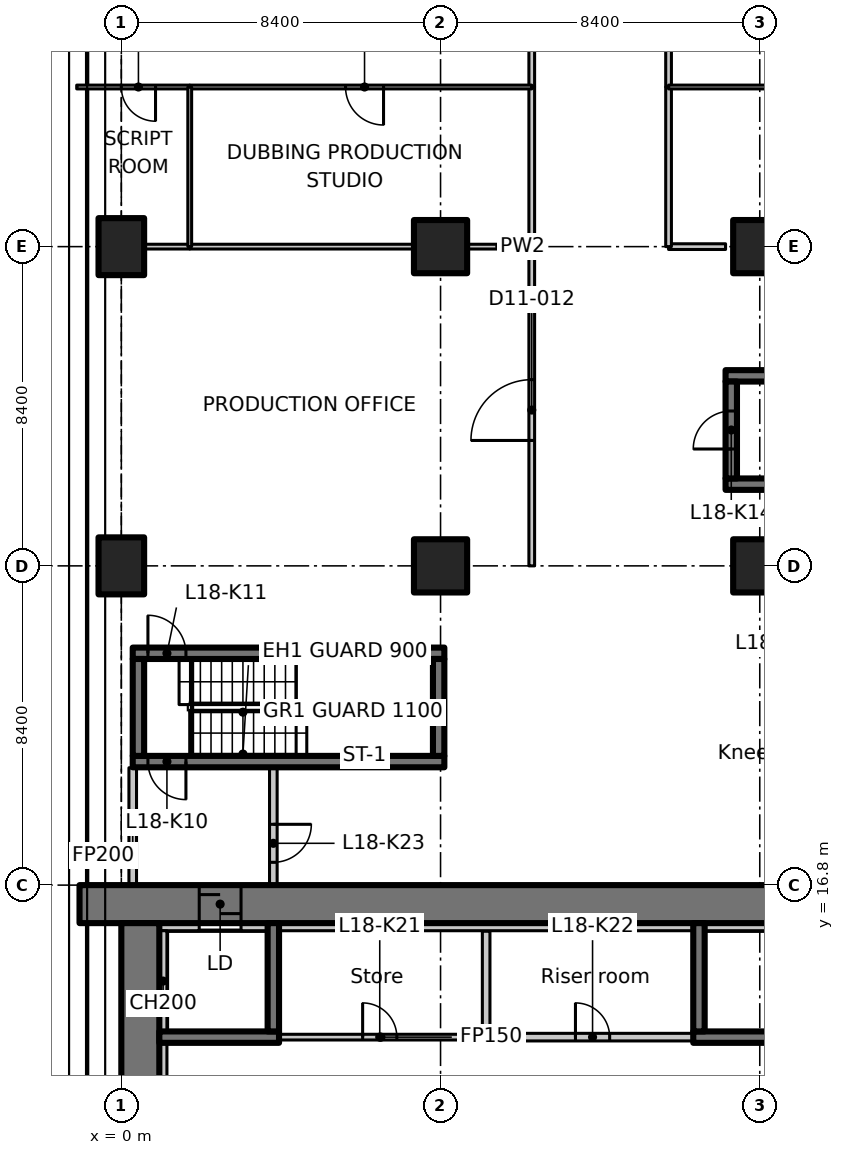
"""IFC4 building model, lengths in metres.
Left out: names, types, materials, properties, quantities, classifications, styles, units other than length and angle.
Written with IfcOpenShell. Run it as: python <this file> out.ifc"""

import sys

from ifc_helpers import new_model, si_unit, direction, frame, frame_2d, origin, origin_2d, place, context, subcontext, project, spatial, polyline, rectangle, outline, extrude, element, fill, save


model = new_model("IFC4")
c1 = context("Model", 3, precision=1e-05, world=origin(), true_north=direction((0.0, 1.0)))
c2 = subcontext(c1, "Body", "Model", "MODEL_VIEW")
j1 = project(units=[si_unit("LENGTHUNIT", "METRE"), si_unit("PLANEANGLEUNIT", "RADIAN")], contexts=[c1])
p1 = place(None, origin())
s1 = spatial("IfcSite", under=j1, at=p1, CompositionType="ELEMENT")
p2 = place(p1, origin())
s2 = spatial("IfcBuilding", under=s1, at=p2, CompositionType="ELEMENT")
p3 = place(p2, frame((0.0, 0.0, 79.7)))
s3 = spatial("IfcBuildingStorey", under=s2, at=p3, CompositionType="ELEMENT", Elevation=79.7)
for number, where, z_axis, x_axis in (
    (1, (0.0, 25.2, 0.0), (0.0, 0.0, 1.0), (1.0, 0.0, 0.0)),
    (2, (0.0, 33.6, 0.0), (0.0, 0.0, 1.0), (1.0, 0.0, 0.0)),
):
    element("IfcColumn", number, at=place(p3, frame(where, z_axis=z_axis, x_axis=x_axis)), inside=s3, PredefinedType="COLUMN", context=c2, shape_type="SweptSolid", body=[
        extrude(rectangle(XDim=1.2, YDim=1.5, at=origin_2d()), origin(), (0.0, 0.0, 1.0), 3.35),
    ])
for number, where, z_axis, x_axis in (
    (3, (8.4, 25.2, 0.0), (0.0, 0.0, 1.0), (1.0, 0.0, 0.0)),
    (4, (8.4, 33.6, 0.0), (0.0, 0.0, 1.0), (1.0, 0.0, 0.0)),
    (5, (16.8, 25.2, 0.0), (0.0, 0.0, 1.0), (1.0, 0.0, 0.0)),
    (6, (16.8, 33.6, 0.0), (0.0, 0.0, 1.0), (1.0, 0.0, 0.0)),
):
    element("IfcColumn", number, at=place(p3, frame(where, z_axis=z_axis, x_axis=x_axis)), inside=s3, PredefinedType="COLUMN", context=c2, shape_type="SweptSolid", body=[
        extrude(rectangle(XDim=1.4, YDim=1.4, at=origin_2d()), origin(), (0.0, 0.0, 1.0), 3.35),
    ])
p4 = place(p3, frame((-1.1, 16.3, 0.0), z_axis=(0.0, 0.0, 1.0), x_axis=(1.0, 0.0, 0.0)))
e7 = element("IfcWall", 7, at=p4, inside=s3, PredefinedType="SHEAR", context=c2, shape_type="SweptSolid", body=[
    extrude(rectangle(XDim=22.1, YDim=1.0, at=frame_2d((11.05, 0.0))), origin(), (0.0, 0.0, 1.0), 3.35),
])
p5 = place(p4, frame((3.15, 0.0, 0.0)))
e8 = element("IfcOpeningElement", 8, at=p5, cuts=e7, PredefinedType="OPENING", context=c2, shape_type="SweptSolid", body=[
    extrude(rectangle(XDim=1.1, YDim=2.3, at=frame_2d((0.55, 1.15))), frame((0.0, 0.51, 0.0), z_axis=(0.0, -1.0, 0.0), x_axis=(1.0, 0.0, 0.0)), (0.0, 0.0, 1.0), 1.02),
])
p6 = place(p3, frame((0.5, 6.936, 0.0), z_axis=(0.0, 0.0, 1.0), x_axis=(0.0, 1.0, 0.0)))
e9 = element("IfcWall", 9, at=p6, inside=s3, PredefinedType="SHEAR", context=c2, shape_type="SweptSolid", body=[
    extrude(rectangle(XDim=8.864, YDim=1.0, at=frame_2d((4.432, 0.0))), origin(), (0.0, 0.0, 1.0), 3.35),
])
p7 = place(p3, frame((1.0, 15.7, 0.0), z_axis=(0.0, 0.0, 1.0), x_axis=(1.0, 0.0, 0.0)))
e10 = element("IfcWall", 10, at=p7, inside=s3, PredefinedType="PARTITIONING", context=c2, shape_type="SweptSolid", body=[
    extrude(rectangle(XDim=1.05, YDim=0.2, at=frame_2d((0.525, 0.0))), origin(), (0.0, 0.0, 1.0), 3.35),
])
p8 = place(p3, frame((1.0, 12.8, 0.0), z_axis=(0.0, 0.0, 1.0), x_axis=(1.0, 0.0, 0.0)))
e11 = element("IfcWall", 11, at=p8, inside=s3, PredefinedType="SHEAR", context=c2, shape_type="SweptSolid", body=[
    extrude(rectangle(XDim=3.15, YDim=0.3, at=frame_2d((1.575, 0.0))), origin(), (0.0, 0.0, 1.0), 3.35),
])
p9 = place(p3, frame((4.0, 12.95, 0.0), z_axis=(0.0, 0.0, 1.0), x_axis=(0.0, 1.0, 0.0)))
e12 = element("IfcWall", 12, at=p9, inside=s3, PredefinedType="SHEAR", context=c2, shape_type="SweptSolid", body=[
    extrude(rectangle(XDim=2.85, YDim=0.3, at=frame_2d((1.425, 0.0))), origin(), (0.0, 0.0, 1.0), 3.35),
])
p10 = place(p3, frame((15.05, 12.8, 0.0), z_axis=(0.0, 0.0, 1.0), x_axis=(1.0, 0.0, 0.0)))
e13 = element("IfcWall", 13, at=p10, inside=s3, PredefinedType="SHEAR", context=c2, shape_type="SweptSolid", body=[
    extrude(rectangle(XDim=5.9, YDim=0.3, at=frame_2d((2.95, 0.0))), origin(), (0.0, 0.0, 1.0), 3.35),
])
p11 = place(p10, frame((3.8, 0.0, 0.0)))
e14 = element("IfcOpeningElement", 14, at=p11, cuts=e13, PredefinedType="OPENING", context=c2, shape_type="SweptSolid", body=[
    extrude(rectangle(XDim=1.1, YDim=2.3, at=frame_2d((0.55, 1.15))), frame((0.0, 0.16, 0.0), z_axis=(0.0, -1.0, 0.0), x_axis=(1.0, 0.0, 0.0)), (0.0, 0.0, 1.0), 0.32),
])
p12 = place(p3, frame((15.2, 12.95, 0.0), z_axis=(0.0, 0.0, 1.0), x_axis=(0.0, 1.0, 0.0)))
e15 = element("IfcWall", 15, at=p12, inside=s3, PredefinedType="SHEAR", context=c2, shape_type="SweptSolid", body=[
    extrude(rectangle(XDim=2.85, YDim=0.3, at=frame_2d((1.425, 0.0))), origin(), (0.0, 0.0, 1.0), 3.35),
])
p13 = place(p3, frame((8.5, 20.05, 0.0), z_axis=(0.0, 0.0, 1.0), x_axis=(-1.0, 0.0, 0.0)))
e16 = element("IfcWall", 16, at=p13, inside=s3, PredefinedType="SHEAR", context=c2, shape_type="SweptSolid", body=[
    extrude(rectangle(XDim=8.2, YDim=0.3, at=frame_2d((4.1, 0.0))), origin(), (0.0, 0.0, 1.0), 3.35),
])
p14 = place(p13, frame((6.8, 0.0, 0.0)))
e17 = element("IfcOpeningElement", 17, at=p14, cuts=e16, PredefinedType="OPENING", context=c2, shape_type="SweptSolid", body=[
    extrude(rectangle(XDim=1.0, YDim=2.1, at=frame_2d((0.5, 1.05))), frame((0.0, 0.16, 0.0), z_axis=(0.0, -1.0, 0.0), x_axis=(1.0, 0.0, 0.0)), (0.0, 0.0, 1.0), 0.32),
])
p15 = place(p3, frame((0.3, 22.9, 0.0), z_axis=(0.0, 0.0, 1.0), x_axis=(1.0, 0.0, 0.0)))
e18 = element("IfcWall", 18, at=p15, inside=s3, PredefinedType="SHEAR", context=c2, shape_type="SweptSolid", body=[
    extrude(rectangle(XDim=8.2, YDim=0.3, at=frame_2d((4.1, 0.0))), origin(), (0.0, 0.0, 1.0), 3.35),
])
p16 = place(p15, frame((0.4, 0.0, 0.0)))
e19 = element("IfcOpeningElement", 19, at=p16, cuts=e18, PredefinedType="OPENING", context=c2, shape_type="SweptSolid", body=[
    extrude(rectangle(XDim=1.0, YDim=2.1, at=frame_2d((0.5, 1.05))), frame((0.0, 0.16, 0.0), z_axis=(0.0, -1.0, 0.0), x_axis=(1.0, 0.0, 0.0)), (0.0, 0.0, 1.0), 0.32),
])
for number, where, z_axis, x_axis in (
    (20, (0.45, 20.2, 0.0), (0.0, 0.0, 1.0), (0.0, 1.0, 0.0)),
    (21, (8.35, 20.2, 0.0), (0.0, 0.0, 1.0), (0.0, 1.0, 0.0)),
):
    element("IfcWall", number, at=place(p3, frame(where, z_axis=z_axis, x_axis=x_axis)), inside=s3, PredefinedType="SHEAR", context=c2, shape_type="SweptSolid", body=[
        extrude(rectangle(XDim=2.55, YDim=0.3, at=frame_2d((1.275, 0.0))), origin(), (0.0, 0.0, 1.0), 3.35),
    ])
for number, where, z_axis, x_axis in (
    (22, (15.9, 27.35, 0.0), (0.0, 0.0, 1.0), (1.0, 0.0, 0.0)),
    (23, (15.9, 30.2, 0.0), (0.0, 0.0, 1.0), (1.0, 0.0, 0.0)),
):
    element("IfcWall", number, at=place(p3, frame(where, z_axis=z_axis, x_axis=x_axis)), inside=s3, PredefinedType="SHEAR", context=c2, shape_type="SweptSolid", body=[
        extrude(rectangle(XDim=8.2, YDim=0.3, at=frame_2d((4.1, 0.0))), origin(), (0.0, 0.0, 1.0), 3.35),
    ])
p17 = place(p3, frame((16.05, 27.5, 0.0), z_axis=(0.0, 0.0, 1.0), x_axis=(0.0, 1.0, 0.0)))
e24 = element("IfcWall", 24, at=p17, inside=s3, PredefinedType="SHEAR", context=c2, shape_type="SweptSolid", body=[
    extrude(rectangle(XDim=2.55, YDim=0.3, at=frame_2d((1.275, 0.0))), origin(), (0.0, 0.0, 1.0), 3.35),
])
p18 = place(p17, frame((0.775, 0.0, 0.0)))
e25 = element("IfcOpeningElement", 25, at=p18, cuts=e24, PredefinedType="OPENING", context=c2, shape_type="SweptSolid", body=[
    extrude(rectangle(XDim=1.0, YDim=2.1, at=frame_2d((0.5, 1.05))), frame((0.0, 0.16, 0.0), z_axis=(0.0, -1.0, 0.0), x_axis=(1.0, 0.0, 0.0)), (0.0, 0.0, 1.0), 0.32),
])
p19 = place(p3, frame((0.3, 16.812, 0.0), z_axis=(0.0, 0.0, 1.0), x_axis=(0.0, 1.0, 0.0)))
e26 = element("IfcWall", 26, at=p19, inside=s3, PredefinedType="PARTITIONING", context=c2, shape_type="SweptSolid", body=[
    extrude(rectangle(XDim=3.076, YDim=0.2, at=frame_2d((1.538, 0.0))), origin(), (0.0, 0.0, 1.0), 2.98),
])
p20 = place(p3, frame((4.0, 19.888, 0.0), z_axis=(0.0, 0.0, 1.0), x_axis=(0.0, -1.0, 0.0)))
e27 = element("IfcWall", 27, at=p20, inside=s3, PredefinedType="PARTITIONING", context=c2, shape_type="SweptSolid", body=[
    extrude(rectangle(XDim=3.076, YDim=0.2, at=frame_2d((1.538, 0.0))), origin(), (0.0, 0.0, 1.0), 3.35),
])
p21 = place(p20, frame((1.488, 0.0, 0.0)))
e28 = element("IfcOpeningElement", 28, at=p21, cuts=e27, PredefinedType="OPENING", context=c2, shape_type="SweptSolid", body=[
    extrude(rectangle(XDim=1.0, YDim=2.1, at=frame_2d((0.5, 1.05))), frame((0.0, 0.11, 0.0), z_axis=(0.0, -1.0, 0.0), x_axis=(1.0, 0.0, 0.0)), (0.0, 0.0, 1.0), 0.22),
])
p22 = place(p3, frame((9.6, 15.588, 0.0), z_axis=(0.0, 0.0, 1.0), x_axis=(0.0, -1.0, 0.0)))
e29 = element("IfcWall", 29, at=p22, inside=s3, PredefinedType="PARTITIONING", context=c2, shape_type="SweptSolid", body=[
    extrude(rectangle(XDim=2.788, YDim=0.2, at=frame_2d((1.394, 0.0))), origin(), (0.0, 0.0, 1.0), 3.35),
])
p23 = place(p3, frame((9.7, 12.8, 0.0), z_axis=(0.0, 0.0, 1.0), x_axis=(1.0, 0.0, 0.0)))
e30 = element("IfcWall", 30, at=p23, inside=s3, PredefinedType="PARTITIONING", context=c2, shape_type="SweptSolid", body=[
    extrude(rectangle(XDim=5.338, YDim=0.2, at=frame_2d((2.669, 0.0))), origin(), (0.0, 0.0, 1.0), 3.35),
])
p24 = place(p23, frame((2.25, 0.0, 0.0)))
e31 = element("IfcOpeningElement", 31, at=p24, cuts=e30, PredefinedType="OPENING", context=c2, shape_type="SweptSolid", body=[
    extrude(rectangle(XDim=0.9, YDim=2.1, at=frame_2d((0.45, 1.05))), frame((0.0, 0.11, 0.0), z_axis=(0.0, -1.0, 0.0), x_axis=(1.0, 0.0, 0.0)), (0.0, 0.0, 1.0), 0.22),
])
p25 = place(p3, frame((4.162, 12.8, 0.0), z_axis=(0.0, 0.0, 1.0), x_axis=(1.0, 0.0, 0.0)))
e32 = element("IfcWall", 32, at=p25, inside=s3, PredefinedType="PARTITIONING", context=c2, shape_type="SweptSolid", body=[
    extrude(rectangle(XDim=5.338, YDim=0.15, at=frame_2d((2.669, 0.0))), origin(), (0.0, 0.0, 1.0), 3.35),
])
p26 = place(p25, frame((2.188, 0.0, 0.0)))
e33 = element("IfcOpeningElement", 33, at=p26, cuts=e32, PredefinedType="OPENING", context=c2, shape_type="SweptSolid", body=[
    extrude(rectangle(XDim=0.9, YDim=2.1, at=frame_2d((0.45, 1.05))), frame((0.0, 0.085, 0.0), z_axis=(0.0, -1.0, 0.0), x_axis=(1.0, 0.0, 0.0)), (0.0, 0.0, 1.0), 0.17),
])
p27 = place(p3, frame((1.1, 9.75, 0.0), z_axis=(0.0, 0.0, 1.0), x_axis=(0.0, 1.0, 0.0)))
e34 = element("IfcWall", 34, at=p27, inside=s3, PredefinedType="PARTITIONING", context=c2, shape_type="SweptSolid", body=[
    extrude(rectangle(XDim=2.9, YDim=0.2, at=frame_2d((1.45, 0.0))), origin(), (0.0, 0.0, 1.0), 3.35),
])
p28 = place(p3, frame((1.1, 12.95, 0.0), z_axis=(0.0, 0.0, 1.0), x_axis=(0.0, 1.0, 0.0)))
e35 = element("IfcWall", 35, at=p28, inside=s3, PredefinedType="PARTITIONING", context=c2, shape_type="SweptSolid", body=[
    extrude(rectangle(XDim=2.65, YDim=0.2, at=frame_2d((1.325, 0.0))), origin(), (0.0, 0.0, 1.0), 3.35),
])
p29 = place(p3, frame((3.15, 15.7, 0.0), z_axis=(0.0, 0.0, 1.0), x_axis=(1.0, 0.0, 0.0)))
e36 = element("IfcWall", 36, at=p29, inside=s3, PredefinedType="PARTITIONING", context=c2, shape_type="SweptSolid", body=[
    extrude(rectangle(XDim=0.7, YDim=0.2, at=frame_2d((0.35, 0.0))), origin(), (0.0, 0.0, 1.0), 3.35),
])
p30 = place(p3, frame((4.15, 15.7, 0.0), z_axis=(0.0, 0.0, 1.0), x_axis=(1.0, 0.0, 0.0)))
e37 = element("IfcWall", 37, at=p30, inside=s3, PredefinedType="PARTITIONING", context=c2, shape_type="SweptSolid", body=[
    extrude(rectangle(XDim=10.9, YDim=0.2, at=frame_2d((5.45, 0.0))), origin(), (0.0, 0.0, 1.0), 3.35),
])
p31 = place(p3, frame((15.35, 15.7, 0.0), z_axis=(0.0, 0.0, 1.0), x_axis=(1.0, 0.0, 0.0)))
e38 = element("IfcWall", 38, at=p31, inside=s3, PredefinedType="PARTITIONING", context=c2, shape_type="SweptSolid", body=[
    extrude(rectangle(XDim=2.5, YDim=0.2, at=frame_2d((1.25, 0.0))), origin(), (0.0, 0.0, 1.0), 3.35),
])
p32 = place(p3, frame((10.8, 25.2, 0.0), z_axis=(0.0, 0.0, 1.0), x_axis=(0.0, 1.0, 0.0)))
e39 = element("IfcWall", 39, at=p32, inside=s3, PredefinedType="PARTITIONING", context=c2, shape_type="SweptSolid", body=[
    extrude(rectangle(XDim=8.4, YDim=0.15, at=frame_2d((4.2, 0.0))), origin(), (0.0, 0.0, 1.0), 3.33),
])
p33 = place(p32, frame((3.3, 0.0, 0.0)))
e40 = element("IfcOpeningElement", 40, at=p33, cuts=e39, PredefinedType="OPENING", context=c2, shape_type="SweptSolid", body=[
    extrude(rectangle(XDim=1.6, YDim=2.1, at=frame_2d((0.8, 1.05))), frame((0.0, 0.085, 0.0), z_axis=(0.0, -1.0, 0.0), x_axis=(1.0, 0.0, 0.0)), (0.0, 0.0, 1.0), 0.17),
])
p34 = place(p3, frame((14.4, 33.6, 0.0), z_axis=(0.0, 0.0, 1.0), x_axis=(1.0, 0.0, 0.0)))
e41 = element("IfcWall", 41, at=p34, inside=s3, PredefinedType="PARTITIONING", context=c2, shape_type="SweptSolid", body=[
    extrude(rectangle(XDim=1.5, YDim=0.15, at=frame_2d((0.75, 0.0))), origin(), (0.0, 0.0, 1.0), 3.33),
])
p35 = place(p3, frame((10.8, 37.8, 0.0), z_axis=(0.0, 0.0, 1.0), x_axis=(0.0, 1.0, 0.0)))
e42 = element("IfcWall", 42, at=p35, inside=s3, PredefinedType="PARTITIONING", context=c2, shape_type="SweptSolid", body=[
    extrude(rectangle(XDim=8.4, YDim=0.15, at=frame_2d((4.2, 0.0))), origin(), (0.0, 0.0, 1.0), 3.33),
])
p36 = place(p35, frame((3.3, 0.0, 0.0)))
e43 = element("IfcOpeningElement", 43, at=p36, cuts=e42, PredefinedType="OPENING", context=c2, shape_type="SweptSolid", body=[
    extrude(rectangle(XDim=1.6, YDim=2.1, at=frame_2d((0.8, 1.05))), frame((0.0, 0.085, 0.0), z_axis=(0.0, -1.0, 0.0), x_axis=(1.0, 0.0, 0.0)), (0.0, 0.0, 1.0), 0.17),
])
for number, where, z_axis, x_axis in (
    (44, (10.8, 33.6, 0.0), (0.0, 0.0, 1.0), (0.0, 1.0, 0.0)),
    (45, (14.4, 37.8, 0.0), (0.0, 0.0, 1.0), (0.0, -1.0, 0.0)),
):
    element("IfcWall", number, at=place(p3, frame(where, z_axis=z_axis, x_axis=x_axis)), inside=s3, PredefinedType="PARTITIONING", context=c2, shape_type="SweptSolid", body=[
        extrude(rectangle(XDim=4.2, YDim=0.15, at=frame_2d((2.1, 0.0))), origin(), (0.0, 0.0, 1.0), 3.33),
    ])
p37 = place(p3, frame((14.4, 54.6, 0.0), z_axis=(0.0, 0.0, 1.0), x_axis=(0.0, -1.0, 0.0)))
e46 = element("IfcWall", 46, at=p37, inside=s3, PredefinedType="PARTITIONING", context=c2, shape_type="SweptSolid", body=[
    extrude(rectangle(XDim=16.8, YDim=0.15, at=frame_2d((8.4, 0.0))), origin(), (0.0, 0.0, 1.0), 3.33),
])
p38 = place(p37, frame((7.5, 0.0, 0.0)))
e47 = element("IfcOpeningElement", 47, at=p38, cuts=e46, PredefinedType="OPENING", context=c2, shape_type="SweptSolid", body=[
    extrude(rectangle(XDim=2.0, YDim=2.4, at=frame_2d((1.0, 1.2))), frame((0.0, 0.085, 0.0), z_axis=(0.0, -1.0, 0.0), x_axis=(1.0, 0.0, 0.0)), (0.0, 0.0, 1.0), 0.17),
])
p39 = place(p3, frame((0.62, 33.6, 0.0), z_axis=(0.0, 0.0, 1.0), x_axis=(1.0, 0.0, 0.0)))
e48 = element("IfcWall", 48, at=p39, inside=s3, PredefinedType="PARTITIONING", context=c2, shape_type="SweptSolid", body=[
    extrude(rectangle(XDim=1.18, YDim=0.125, at=frame_2d((0.59, 0.0))), origin(), (0.0, 0.0, 1.0), 3.33),
])
p40 = place(p3, frame((1.8, 33.6, 0.0), z_axis=(0.0, 0.0, 1.0), x_axis=(1.0, 0.0, 0.0)))
e49 = element("IfcWall", 49, at=p40, inside=s3, PredefinedType="PARTITIONING", context=c2, shape_type="SweptSolid", body=[
    extrude(rectangle(XDim=5.88, YDim=0.125, at=frame_2d((2.94, 0.0))), origin(), (0.0, 0.0, 1.0), 3.33),
])
p41 = place(p3, frame((9.12, 33.6, 0.0), z_axis=(0.0, 0.0, 1.0), x_axis=(1.0, 0.0, 0.0)))
e50 = element("IfcWall", 50, at=p41, inside=s3, PredefinedType="PARTITIONING", context=c2, shape_type="SweptSolid", body=[
    extrude(rectangle(XDim=1.68, YDim=0.125, at=frame_2d((0.84, 0.0))), origin(), (0.0, 0.0, 1.0), 3.33),
])
p42 = place(p3, frame((1.8, 37.8, 0.0), z_axis=(0.0, 0.0, 1.0), x_axis=(-1.0, 0.0, 0.0)))
e51 = element("IfcWall", 51, at=p42, inside=s3, PredefinedType="PARTITIONING", context=c2, shape_type="SweptSolid", body=[
    extrude(rectangle(XDim=2.974, YDim=0.1, at=frame_2d((1.487, 0.0))), origin(), (0.0, 0.0, 1.0), 2.98),
])
p43 = place(p42, frame((0.9, 0.0, 0.0)))
e52 = element("IfcOpeningElement", 52, at=p43, cuts=e51, PredefinedType="OPENING", context=c2, shape_type="SweptSolid", body=[
    extrude(rectangle(XDim=0.9, YDim=2.1, at=frame_2d((0.45, 1.05))), frame((0.0, 0.06, 0.0), z_axis=(0.0, -1.0, 0.0), x_axis=(1.0, 0.0, 0.0)), (0.0, 0.0, 1.0), 0.12),
])
p44 = place(p3, frame((10.8, 37.8, 0.0), z_axis=(0.0, 0.0, 1.0), x_axis=(-1.0, 0.0, 0.0)))
e53 = element("IfcWall", 53, at=p44, inside=s3, PredefinedType="PARTITIONING", context=c2, shape_type="SweptSolid", body=[
    extrude(rectangle(XDim=9.0, YDim=0.1, at=frame_2d((4.5, 0.0))), origin(), (0.0, 0.0, 1.0), 3.33),
])
p45 = place(p44, frame((3.9, 0.0, 0.0)))
e54 = element("IfcOpeningElement", 54, at=p45, cuts=e53, PredefinedType="OPENING", context=c2, shape_type="SweptSolid", body=[
    extrude(rectangle(XDim=1.0, YDim=2.1, at=frame_2d((0.5, 1.05))), frame((0.0, 0.06, 0.0), z_axis=(0.0, -1.0, 0.0), x_axis=(1.0, 0.0, 0.0)), (0.0, 0.0, 1.0), 0.12),
])
p46 = place(p3, frame((1.8, 37.8, 0.0), z_axis=(0.0, 0.0, 1.0), x_axis=(0.0, -1.0, 0.0)))
e55 = element("IfcWall", 55, at=p46, inside=s3, PredefinedType="PARTITIONING", context=c2, shape_type="SweptSolid", body=[
    extrude(rectangle(XDim=4.2, YDim=0.1, at=frame_2d((2.1, 0.0))), origin(), (0.0, 0.0, 1.0), 3.33),
])
p47 = place(p3, frame((14.4, 37.8, 0.0), z_axis=(0.0, 0.0, 1.0), x_axis=(1.0, 0.0, 0.0)))
e56 = element("IfcWall", 56, at=p47, inside=s3, PredefinedType="PARTITIONING", context=c2, shape_type="SweptSolid", body=[
    extrude(outline(polyline([(0.0, 0.0), (15.843, 0.0), (15.843, 3.33), (11.25, 3.33), (11.248, 2.98), (10.352, 2.98), (10.35, 3.33), (0.0, 3.33), (0.0, 0.0)])), frame((0.0, 0.05, 0.0), z_axis=(0.0, -1.0, 0.0), x_axis=(1.0, 0.0, 0.0)), (0.0, 0.0, 1.0), 0.1),
])
p48 = place(p5, origin())
e57 = element("IfcDoor", 57, at=p48, inside=s3, OperationType="SLIDING_TO_LEFT", PredefinedType="DOOR", context=c2, shape_type="SweptSolid", body=[
    extrude(rectangle(XDim=1.1, YDim=2.3, at=frame_2d((0.55, 1.15))), frame((0.0, 0.025, 0.0), z_axis=(0.0, -1.0, 0.0), x_axis=(1.0, 0.0, 0.0)), (0.0, 0.0, 1.0), 0.05),
])
fill(e8, e57)
p49 = place(p14, origin())
e58 = element("IfcDoor", 58, at=p49, inside=s3, OperationType="SINGLE_SWING_RIGHT", PredefinedType="DOOR", context=c2, shape_type="SweptSolid", body=[
    extrude(rectangle(XDim=1.0, YDim=2.1, at=frame_2d((0.5, 1.05))), frame((0.0, 0.025, 0.0), z_axis=(0.0, -1.0, 0.0), x_axis=(1.0, 0.0, 0.0)), (0.0, 0.0, 1.0), 0.05),
])
fill(e17, e58)
p50 = place(p16, origin())
e59 = element("IfcDoor", 59, at=p50, inside=s3, OperationType="SINGLE_SWING_LEFT", PredefinedType="DOOR", context=c2, shape_type="SweptSolid", body=[
    extrude(rectangle(XDim=1.0, YDim=2.1, at=frame_2d((0.5, 1.05))), frame((0.0, 0.025, 0.0), z_axis=(0.0, -1.0, 0.0), x_axis=(1.0, 0.0, 0.0)), (0.0, 0.0, 1.0), 0.05),
])
fill(e19, e59)
p51 = place(p18, origin())
e60 = element("IfcDoor", 60, at=p51, inside=s3, OperationType="SINGLE_SWING_RIGHT", PredefinedType="DOOR", context=c2, shape_type="SweptSolid", body=[
    extrude(rectangle(XDim=1.0, YDim=2.1, at=frame_2d((0.5, 1.05))), frame((0.0, 0.025, 0.0), z_axis=(0.0, -1.0, 0.0), x_axis=(1.0, 0.0, 0.0)), (0.0, 0.0, 1.0), 0.05),
])
fill(e25, e60)
p52 = place(p26, origin())
e61 = element("IfcDoor", 61, at=p52, inside=s3, OperationType="SINGLE_SWING_LEFT", PredefinedType="DOOR", context=c2, shape_type="SweptSolid", body=[
    extrude(rectangle(XDim=0.9, YDim=2.1, at=frame_2d((0.45, 1.05))), frame((0.0, 0.025, 0.0), z_axis=(0.0, -1.0, 0.0), x_axis=(1.0, 0.0, 0.0)), (0.0, 0.0, 1.0), 0.05),
])
fill(e33, e61)
p53 = place(p24, origin())
e62 = element("IfcDoor", 62, at=p53, inside=s3, OperationType="SINGLE_SWING_RIGHT", PredefinedType="DOOR", context=c2, shape_type="SweptSolid", body=[
    extrude(rectangle(XDim=0.9, YDim=2.1, at=frame_2d((0.45, 1.05))), frame((0.0, 0.025, 0.0), z_axis=(0.0, -1.0, 0.0), x_axis=(1.0, 0.0, 0.0)), (0.0, 0.0, 1.0), 0.05),
])
fill(e31, e62)
p54 = place(p21, origin())
e63 = element("IfcDoor", 63, at=p54, inside=s3, OperationType="SINGLE_SWING_LEFT", PredefinedType="DOOR", context=c2, shape_type="SweptSolid", body=[
    extrude(rectangle(XDim=1.0, YDim=2.1, at=frame_2d((0.5, 1.05))), frame((0.0, 0.025, 0.0), z_axis=(0.0, -1.0, 0.0), x_axis=(1.0, 0.0, 0.0)), (0.0, 0.0, 1.0), 0.05),
])
fill(e28, e63)
p55 = place(p33, origin())
e64 = element("IfcDoor", 64, at=p55, inside=s3, OperationType="DOUBLE_DOOR_SINGLE_SWING", PredefinedType="DOOR", context=c2, shape_type="SweptSolid", body=[
    extrude(rectangle(XDim=1.6, YDim=2.1, at=frame_2d((0.8, 1.05))), frame((0.0, 0.025, 0.0), z_axis=(0.0, -1.0, 0.0), x_axis=(1.0, 0.0, 0.0)), (0.0, 0.0, 1.0), 0.05),
])
fill(e40, e64)
p56 = place(p43, origin())
e65 = element("IfcDoor", 65, at=p56, inside=s3, OperationType="SINGLE_SWING_LEFT", PredefinedType="DOOR", context=c2, shape_type="SweptSolid", body=[
    extrude(rectangle(XDim=0.9, YDim=2.1, at=frame_2d((0.45, 1.05))), frame((0.0, 0.025, 0.0), z_axis=(0.0, -1.0, 0.0), x_axis=(1.0, 0.0, 0.0)), (0.0, 0.0, 1.0), 0.05),
])
fill(e52, e65)
p57 = place(p45, origin())
e66 = element("IfcDoor", 66, at=p57, inside=s3, OperationType="SINGLE_SWING_LEFT", PredefinedType="DOOR", context=c2, shape_type="SweptSolid", body=[
    extrude(rectangle(XDim=1.0, YDim=2.1, at=frame_2d((0.5, 1.05))), frame((0.0, 0.025, 0.0), z_axis=(0.0, -1.0, 0.0), x_axis=(1.0, 0.0, 0.0)), (0.0, 0.0, 1.0), 0.05),
])
fill(e54, e66)
save(model, sys.argv[1])
